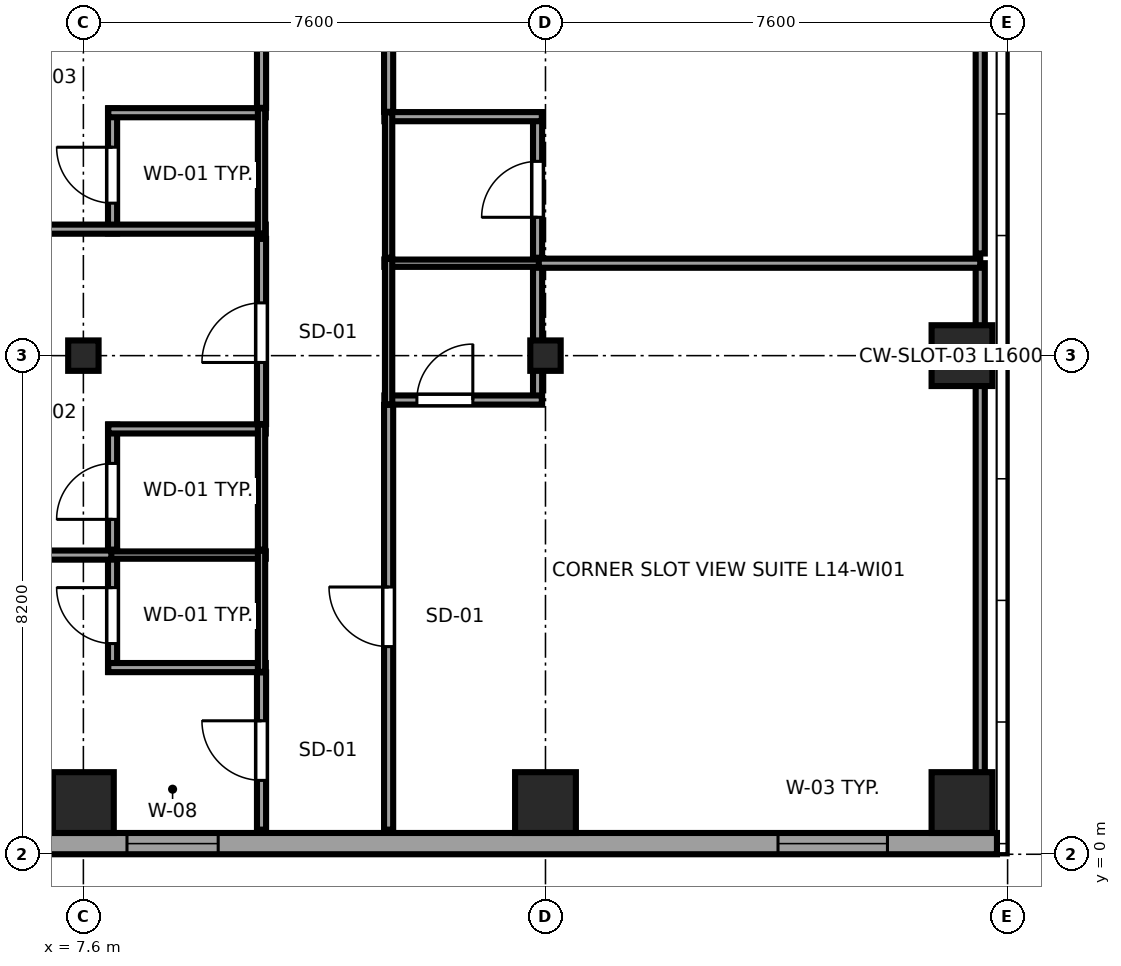
"""IFC4 building model, lengths in metres.
Left out: names, types, materials, properties, quantities, classifications, styles, units other than length and angle.
Written with IfcOpenShell. Run it as: python <this file> out.ifc"""

import sys

from ifc_helpers import new_model, si_unit, direction, frame, frame_2d, origin, origin_2d, place, context, subcontext, project, spatial, rectangle, i_section, extrude, source, transform, mapped, element, fill, save


model = new_model("IFC4")
c1 = context("Model", 3, precision=1e-05, world=origin(), true_north=direction((0.0, 1.0)))
c2 = subcontext(c1, "Body", "Model", "MODEL_VIEW")
j1 = project(units=[si_unit("LENGTHUNIT", "METRE"), si_unit("PLANEANGLEUNIT", "RADIAN")], contexts=[c1])
p1 = place(None, origin())
s1 = spatial("IfcSite", under=j1, at=p1, CompositionType="ELEMENT")
p2 = place(p1, origin())
s2 = spatial("IfcBuilding", under=s1, at=p2, CompositionType="ELEMENT")
p3 = place(p2, frame((0.0, 0.0, 60.4)))
s3 = spatial("IfcBuildingStorey", under=s2, at=p3, CompositionType="ELEMENT", Elevation=60.4)
m1 = source(origin(), c2, "Body", "SweptSolid", [
    extrude(rectangle(XDim=1.0, YDim=1.0, at=origin_2d()), origin(), (0.0, 0.0, 1.0), 3.55),
])
p4 = place(p3, frame((7.6, 0.85, 0.0), z_axis=(0.0, 0.0, 1.0), x_axis=(1.0, 0.0, 0.0)))
e1 = element("IfcColumn", 1, at=p4, inside=s3, PredefinedType="COLUMN", context=c2, shape_type="MappedRepresentation", body=[
    mapped(m1, transform((0.0, 0.0, 0.0), x_axis=(1.0, 0.0, 0.0), y_axis=(0.0, 1.0, 0.0), z_axis=(0.0, 0.0, 1.0), scale=1.0)),
])
m2 = source(origin(), c2, "Body", "SweptSolid", [
    extrude(i_section(OverallWidth=0.5, OverallDepth=0.5, WebThickness=0.028, FlangeThickness=0.045, at=origin_2d()), origin(), (0.0, 0.0, 1.0), 3.55),
])
p5 = place(p3, frame((7.6, 8.2, 0.0), z_axis=(0.0, 0.0, 1.0), x_axis=(1.0, 0.0, 0.0)))
e2 = element("IfcColumn", 2, at=p5, inside=s3, PredefinedType="COLUMN", context=c2, shape_type="MappedRepresentation", body=[
    mapped(m2, transform((0.0, 0.0, 0.0), x_axis=(1.0, 0.0, 0.0), y_axis=(0.0, 1.0, 0.0), z_axis=(0.0, 0.0, 1.0), scale=1.0)),
])
p6 = place(p3, frame((15.2, 0.85, 0.0), z_axis=(0.0, 0.0, 1.0), x_axis=(1.0, 0.0, 0.0)))
e3 = element("IfcColumn", 3, at=p6, inside=s3, PredefinedType="COLUMN", context=c2, shape_type="MappedRepresentation", body=[
    mapped(m1, transform((0.0, 0.0, 0.0), x_axis=(1.0, 0.0, 0.0), y_axis=(0.0, 1.0, 0.0), z_axis=(0.0, 0.0, 1.0), scale=1.0)),
])
p7 = place(p3, frame((15.2, 8.2, 0.0), z_axis=(0.0, 0.0, 1.0), x_axis=(1.0, 0.0, 0.0)))
e4 = element("IfcColumn", 4, at=p7, inside=s3, PredefinedType="COLUMN", context=c2, shape_type="MappedRepresentation", body=[
    mapped(m2, transform((0.0, 0.0, 0.0), x_axis=(1.0, 0.0, 0.0), y_axis=(0.0, 1.0, 0.0), z_axis=(0.0, 0.0, 1.0), scale=1.0)),
])
for number, where, z_axis, x_axis in (
    (5, (22.05, 0.85, 0.0), (0.0, 0.0, 1.0), (1.0, 0.0, 0.0)),
    (6, (22.05, 8.2, 0.0), (0.0, 0.0, 1.0), (1.0, 0.0, 0.0)),
):
    element("IfcColumn", number, at=place(p3, frame(where, z_axis=z_axis, x_axis=x_axis)), inside=s3, PredefinedType="COLUMN", context=c2, shape_type="MappedRepresentation", body=[
        mapped(m1, transform((0.0, 0.0, 0.0), x_axis=(1.0, 0.0, 0.0), y_axis=(0.0, 1.0, 0.0), z_axis=(0.0, 0.0, 1.0), scale=1.0)),
    ])
p8 = place(p3, frame((4.617, 0.175, 0.0), z_axis=(0.0, 0.0, 1.0), x_axis=(1.0, 0.0, 0.0)))
e7 = element("IfcWall", 7, at=p8, inside=s3, PredefinedType="SOLIDWALL", context=c2, shape_type="SweptSolid", body=[
    extrude(rectangle(XDim=18.008, YDim=0.35, at=frame_2d((9.004, 0.0))), origin(), (0.0, 0.0, 1.0), 3.37),
])
p9 = place(p8, frame((14.407, 0.0, 0.68)))
e8 = element("IfcOpeningElement", 8, at=p9, cuts=e7, PredefinedType="OPENING", context=c2, shape_type="SweptSolid", body=[
    extrude(rectangle(XDim=1.8, YDim=1.85, at=frame_2d((0.9, 0.925))), frame((0.0, 0.185, 0.0), z_axis=(0.0, -1.0, 0.0), x_axis=(1.0, 0.0, 0.0)), (0.0, 0.0, 1.0), 0.37),
])
p10 = place(p8, frame((3.7, 0.0, 0.62)))
e9 = element("IfcOpeningElement", 9, at=p10, cuts=e7, PredefinedType="OPENING", context=c2, shape_type="SweptSolid", body=[
    extrude(rectangle(XDim=1.5, YDim=1.55, at=frame_2d((0.75, 0.775))), frame((0.0, 0.185, 0.0), z_axis=(0.0, -1.0, 0.0), x_axis=(1.0, 0.0, 0.0)), (0.0, 0.0, 1.0), 0.37),
])
p11 = place(p3, frame((8.08, 3.0, 0.0), z_axis=(0.0, 0.0, 1.0), x_axis=(0.0, 1.0, 0.0)))
e10 = element("IfcWall", 10, at=p11, inside=s3, PredefinedType="PARTITIONING", context=c2, shape_type="SweptSolid", body=[
    extrude(rectangle(XDim=1.99, YDim=0.15, at=frame_2d((0.995, 0.0))), origin(), (0.0, 0.0, 1.0), 3.37),
])
p12 = place(p11, frame((0.465, 0.0, 0.0)))
e11 = element("IfcOpeningElement", 11, at=p12, cuts=e10, PredefinedType="OPENING", context=c2, shape_type="SweptSolid", body=[
    extrude(rectangle(XDim=0.92, YDim=2.01, at=frame_2d((0.46, 1.005))), frame((0.0, 0.085, 0.0), z_axis=(0.0, -1.0, 0.0), x_axis=(1.0, 0.0, 0.0)), (0.0, 0.0, 1.0), 0.17),
])
p13 = place(p3, frame((8.01, 3.07, 0.0), z_axis=(0.0, 0.0, 1.0), x_axis=(1.0, 0.0, 0.0)))
e12 = element("IfcWall", 12, at=p13, inside=s3, PredefinedType="PARTITIONING", context=c2, shape_type="SweptSolid", body=[
    extrude(rectangle(XDim=2.59, YDim=0.15, at=frame_2d((1.295, 0.0))), origin(), (0.0, 0.0, 1.0), 3.37),
])
p14 = place(p3, frame((8.01, 4.92, 0.0), z_axis=(0.0, 0.0, 1.0), x_axis=(1.0, 0.0, 0.0)))
e13 = element("IfcWall", 13, at=p14, inside=s3, PredefinedType="PLUMBINGWALL", context=c2, shape_type="SweptSolid", body=[
    extrude(rectangle(XDim=2.59, YDim=0.12, at=frame_2d((1.295, 0.0))), origin(), (0.0, 0.0, 1.0), 3.37),
])
p15 = place(p3, frame((10.53, 3.0, 0.0), z_axis=(0.0, 0.0, 1.0), x_axis=(0.0, 1.0, 0.0)))
e14 = element("IfcWall", 14, at=p15, inside=s3, PredefinedType="PLUMBINGWALL", context=c2, shape_type="SweptSolid", body=[
    extrude(rectangle(XDim=1.99, YDim=0.12, at=frame_2d((0.995, 0.0))), origin(), (0.0, 0.0, 1.0), 3.37),
])
p16 = place(p3, frame((8.08, 5.01, 0.0), z_axis=(0.0, 0.0, 1.0), x_axis=(0.0, 1.0, 0.0)))
e15 = element("IfcWall", 15, at=p16, inside=s3, PredefinedType="PARTITIONING", context=c2, shape_type="SweptSolid", body=[
    extrude(rectangle(XDim=2.055, YDim=0.15, at=frame_2d((1.027, 0.0))), origin(), (0.0, 0.0, 1.0), 3.37),
])
p17 = place(p16, frame((0.498, 0.0, 0.0)))
e16 = element("IfcOpeningElement", 16, at=p17, cuts=e15, PredefinedType="OPENING", context=c2, shape_type="SweptSolid", body=[
    extrude(rectangle(XDim=0.92, YDim=2.01, at=frame_2d((0.46, 1.005))), frame((0.0, 0.085, 0.0), z_axis=(0.0, -1.0, 0.0), x_axis=(1.0, 0.0, 0.0)), (0.0, 0.0, 1.0), 0.17),
])
p18 = place(p3, frame((8.01, 6.995, 0.0), z_axis=(0.0, 0.0, 1.0), x_axis=(1.0, 0.0, 0.0)))
e17 = element("IfcWall", 17, at=p18, inside=s3, PredefinedType="PARTITIONING", context=c2, shape_type="SweptSolid", body=[
    extrude(rectangle(XDim=2.59, YDim=0.15, at=frame_2d((1.295, 0.0))), origin(), (0.0, 0.0, 1.0), 3.37),
])
p19 = place(p3, frame((10.53, 5.01, 0.0), z_axis=(0.0, 0.0, 1.0), x_axis=(0.0, 1.0, 0.0)))
e18 = element("IfcWall", 18, at=p19, inside=s3, PredefinedType="PLUMBINGWALL", context=c2, shape_type="SweptSolid", body=[
    extrude(rectangle(XDim=2.055, YDim=0.12, at=frame_2d((1.027, 0.0))), origin(), (0.0, 0.0, 1.0), 3.37),
])
p20 = place(p3, frame((8.08, 10.21, 0.0), z_axis=(0.0, 0.0, 1.0), x_axis=(0.0, 1.0, 0.0)))
e19 = element("IfcWall", 19, at=p20, inside=s3, PredefinedType="PARTITIONING", context=c2, shape_type="SweptSolid", body=[
    extrude(rectangle(XDim=2.055, YDim=0.15, at=frame_2d((1.027, 0.0))), origin(), (0.0, 0.0, 1.0), 3.37),
])
p21 = place(p20, frame((0.498, 0.0, 0.0)))
e20 = element("IfcOpeningElement", 20, at=p21, cuts=e19, PredefinedType="OPENING", context=c2, shape_type="SweptSolid", body=[
    extrude(rectangle(XDim=0.92, YDim=2.01, at=frame_2d((0.46, 1.005))), frame((0.0, 0.085, 0.0), z_axis=(0.0, -1.0, 0.0), x_axis=(1.0, 0.0, 0.0)), (0.0, 0.0, 1.0), 0.17),
])
p22 = place(p3, frame((0.405, 10.28, 0.0), z_axis=(0.0, 0.0, 1.0), x_axis=(1.0, 0.0, 0.0)))
e21 = element("IfcWall", 21, at=p22, inside=s3, PredefinedType="PARTITIONING", context=c2, shape_type="SweptSolid", body=[
    extrude(rectangle(XDim=10.195, YDim=0.15, at=frame_2d((5.098, 0.0))), origin(), (0.0, 0.0, 1.0), 3.37),
])
p23 = place(p3, frame((8.01, 12.195, 0.0), z_axis=(0.0, 0.0, 1.0), x_axis=(1.0, 0.0, 0.0)))
e22 = element("IfcWall", 22, at=p23, inside=s3, PredefinedType="PARTITIONING", context=c2, shape_type="SweptSolid", body=[
    extrude(rectangle(XDim=2.59, YDim=0.15, at=frame_2d((1.295, 0.0))), origin(), (0.0, 0.0, 1.0), 3.37),
])
p24 = place(p3, frame((10.53, 10.21, 0.0), z_axis=(0.0, 0.0, 1.0), x_axis=(0.0, 1.0, 0.0)))
e23 = element("IfcWall", 23, at=p24, inside=s3, PredefinedType="PLUMBINGWALL", context=c2, shape_type="SweptSolid", body=[
    extrude(rectangle(XDim=2.055, YDim=0.12, at=frame_2d((1.027, 0.0))), origin(), (0.0, 0.0, 1.0), 3.37),
])
p25 = place(p3, frame((15.07, 7.4, 0.0), z_axis=(0.0, 0.0, 1.0), x_axis=(0.0, 1.0, 0.0)))
e24 = element("IfcWall", 24, at=p25, inside=s3, PredefinedType="PARTITIONING", context=c2, shape_type="SweptSolid", body=[
    extrude(rectangle(XDim=2.39, YDim=0.15, at=frame_2d((1.195, 0.0))), origin(), (0.0, 0.0, 1.0), 2.827),
])
p26 = place(p3, frame((12.55, 7.47, 0.0), z_axis=(0.0, 0.0, 1.0), x_axis=(1.0, 0.0, 0.0)))
e25 = element("IfcWall", 25, at=p26, inside=s3, PredefinedType="PARTITIONING", context=c2, shape_type="SweptSolid", body=[
    extrude(rectangle(XDim=2.59, YDim=0.15, at=frame_2d((1.295, 0.0))), origin(), (0.0, 0.0, 1.0), 3.37),
])
p27 = place(p26, frame((0.535, 0.0, 0.0)))
e26 = element("IfcOpeningElement", 26, at=p27, cuts=e25, PredefinedType="OPENING", context=c2, shape_type="SweptSolid", body=[
    extrude(rectangle(XDim=0.92, YDim=2.01, at=frame_2d((0.46, 1.005))), frame((0.0, 0.085, 0.0), z_axis=(0.0, -1.0, 0.0), x_axis=(1.0, 0.0, 0.0)), (0.0, 0.0, 1.0), 0.17),
])
p28 = place(p3, frame((12.55, 9.72, 0.0), z_axis=(0.0, 0.0, 1.0), x_axis=(1.0, 0.0, 0.0)))
e27 = element("IfcWall", 27, at=p28, inside=s3, PredefinedType="PLUMBINGWALL", context=c2, shape_type="SweptSolid", body=[
    extrude(rectangle(XDim=2.59, YDim=0.12, at=frame_2d((1.295, 0.0))), origin(), (0.0, 0.0, 1.0), 3.37),
])
p29 = place(p3, frame((12.62, 7.4, 0.0), z_axis=(0.0, 0.0, 1.0), x_axis=(0.0, 1.0, 0.0)))
e28 = element("IfcWall", 28, at=p29, inside=s3, PredefinedType="PLUMBINGWALL", context=c2, shape_type="SweptSolid", body=[
    extrude(rectangle(XDim=2.39, YDim=0.12, at=frame_2d((1.195, 0.0))), origin(), (0.0, 0.0, 1.0), 3.37),
])
p30 = place(p3, frame((15.07, 9.81, 0.0), z_axis=(0.0, 0.0, 1.0), x_axis=(0.0, 1.0, 0.0)))
e29 = element("IfcWall", 29, at=p30, inside=s3, PredefinedType="PARTITIONING", context=c2, shape_type="SweptSolid", body=[
    extrude(rectangle(XDim=2.39, YDim=0.15, at=frame_2d((1.195, 0.0))), origin(), (0.0, 0.0, 1.0), 2.827),
])
p31 = place(p30, frame((0.665, 0.0, 0.0)))
e30 = element("IfcOpeningElement", 30, at=p31, cuts=e29, PredefinedType="OPENING", context=c2, shape_type="SweptSolid", body=[
    extrude(rectangle(XDim=0.92, YDim=2.01, at=frame_2d((0.46, 1.005))), frame((0.0, 0.085, 0.0), z_axis=(0.0, -1.0, 0.0), x_axis=(1.0, 0.0, 0.0)), (0.0, 0.0, 1.0), 0.17),
])
p32 = place(p3, frame((12.55, 12.13, 0.0), z_axis=(0.0, 0.0, 1.0), x_axis=(1.0, 0.0, 0.0)))
e31 = element("IfcWall", 31, at=p32, inside=s3, PredefinedType="PARTITIONING", context=c2, shape_type="SweptSolid", body=[
    extrude(rectangle(XDim=2.59, YDim=0.15, at=frame_2d((1.295, 0.0))), origin(), (0.0, 0.0, 1.0), 3.37),
])
p33 = place(p3, frame((12.62, 9.81, 0.0), z_axis=(0.0, 0.0, 1.0), x_axis=(0.0, 1.0, 0.0)))
e32 = element("IfcWall", 32, at=p33, inside=s3, PredefinedType="PLUMBINGWALL", context=c2, shape_type="SweptSolid", body=[
    extrude(rectangle(XDim=2.39, YDim=0.12, at=frame_2d((1.195, 0.0))), origin(), (0.0, 0.0, 1.0), 3.37),
])
p34 = place(p3, frame((10.53, 0.405, 0.0), z_axis=(0.0, 0.0, 1.0), x_axis=(0.0, 1.0, 0.0)))
e33 = element("IfcWall", 33, at=p34, inside=s3, PredefinedType="PARTITIONING", context=c2, shape_type="SweptSolid", body=[
    extrude(rectangle(XDim=2.585, YDim=0.15, at=frame_2d((1.292, 0.0))), origin(), (0.0, 0.0, 1.0), 3.37),
])
p35 = place(p34, frame((0.81, 0.0, 0.0)))
e34 = element("IfcOpeningElement", 34, at=p35, cuts=e33, PredefinedType="OPENING", context=c2, shape_type="SweptSolid", body=[
    extrude(rectangle(XDim=0.98, YDim=2.12, at=frame_2d((0.49, 1.06))), frame((0.0, 0.085, 0.0), z_axis=(0.0, -1.0, 0.0), x_axis=(1.0, 0.0, 0.0)), (0.0, 0.0, 1.0), 0.17),
])
p36 = place(p3, frame((0.405, 4.92, 0.0), z_axis=(0.0, 0.0, 1.0), x_axis=(1.0, 0.0, 0.0)))
e35 = element("IfcWall", 35, at=p36, inside=s3, PredefinedType="PARTITIONING", context=c2, shape_type="SweptSolid", body=[
    extrude(rectangle(XDim=7.655, YDim=0.15, at=frame_2d((3.828, 0.0))), origin(), (0.0, 0.0, 1.0), 3.37),
])
p37 = place(p3, frame((10.53, 7.075, 0.0), z_axis=(0.0, 0.0, 1.0), x_axis=(0.0, 1.0, 0.0)))
e36 = element("IfcWall", 36, at=p37, inside=s3, PredefinedType="PARTITIONING", context=c2, shape_type="SweptSolid", body=[
    extrude(rectangle(XDim=3.045, YDim=0.15, at=frame_2d((1.522, 0.0))), origin(), (0.0, 0.0, 1.0), 3.37),
])
p38 = place(p37, frame((1.012, 0.0, 0.0)))
e37 = element("IfcOpeningElement", 37, at=p38, cuts=e36, PredefinedType="OPENING", context=c2, shape_type="SweptSolid", body=[
    extrude(rectangle(XDim=0.98, YDim=2.12, at=frame_2d((0.49, 1.06))), frame((0.0, 0.085, 0.0), z_axis=(0.0, -1.0, 0.0), x_axis=(1.0, 0.0, 0.0)), (0.0, 0.0, 1.0), 0.17),
])
p39 = place(p3, frame((10.53, 12.275, 0.0), z_axis=(0.0, 0.0, 1.0), x_axis=(0.0, 1.0, 0.0)))
e38 = element("IfcWall", 38, at=p39, inside=s3, PredefinedType="PARTITIONING", context=c2, shape_type="SweptSolid", body=[
    extrude(rectangle(XDim=3.045, YDim=0.15, at=frame_2d((1.522, 0.0))), origin(), (0.0, 0.0, 1.0), 3.37),
])
p40 = place(p39, frame((1.012, 0.0, 0.0)))
e39 = element("IfcOpeningElement", 39, at=p40, cuts=e38, PredefinedType="OPENING", context=c2, shape_type="SweptSolid", body=[
    extrude(rectangle(XDim=0.98, YDim=2.12, at=frame_2d((0.49, 1.06))), frame((0.0, 0.085, 0.0), z_axis=(0.0, -1.0, 0.0), x_axis=(1.0, 0.0, 0.0)), (0.0, 0.0, 1.0), 0.17),
])
p41 = place(p3, frame((12.62, 0.405, 0.0), z_axis=(0.0, 0.0, 1.0), x_axis=(0.0, 1.0, 0.0)))
e40 = element("IfcWall", 40, at=p41, inside=s3, PredefinedType="PARTITIONING", context=c2, shape_type="SweptSolid", body=[
    extrude(rectangle(XDim=6.985, YDim=0.15, at=frame_2d((3.492, 0.0))), origin(), (0.0, 0.0, 1.0), 3.37),
])
p42 = place(p41, frame((3.01, 0.0, 0.0)))
e41 = element("IfcOpeningElement", 41, at=p42, cuts=e40, PredefinedType="OPENING", context=c2, shape_type="SweptSolid", body=[
    extrude(rectangle(XDim=0.98, YDim=2.12, at=frame_2d((0.49, 1.06))), frame((0.0, 0.085, 0.0), z_axis=(0.0, -1.0, 0.0), x_axis=(1.0, 0.0, 0.0)), (0.0, 0.0, 1.0), 0.17),
])
p43 = place(p3, frame((22.35, 0.405, 0.0), z_axis=(0.0, 0.0, 1.0), x_axis=(0.0, 1.0, 0.0)))
e42 = element("IfcWall", 42, at=p43, inside=s3, PredefinedType="PARTITIONING", context=c2, shape_type="SweptSolid", body=[
    extrude(rectangle(XDim=9.315, YDim=0.15, at=frame_2d((4.657, 0.0))), origin(), (0.0, 0.0, 1.0), 3.37),
])
p44 = place(p3, frame((15.09, 9.72, 0.0), z_axis=(0.0, 0.0, 1.0), x_axis=(1.0, 0.0, 0.0)))
e43 = element("IfcWall", 43, at=p44, inside=s3, PredefinedType="PARTITIONING", context=c2, shape_type="SweptSolid", body=[
    extrude(rectangle(XDim=7.26, YDim=0.15, at=frame_2d((3.63, 0.0))), origin(), (0.0, 0.0, 1.0), 3.37),
])
p45 = place(p3, frame((12.62, 12.21, 0.0), z_axis=(0.0, 0.0, 1.0), x_axis=(0.0, 1.0, 0.0)))
e44 = element("IfcWall", 44, at=p45, inside=s3, PredefinedType="PARTITIONING", context=c2, shape_type="SweptSolid", body=[
    extrude(rectangle(XDim=8.01, YDim=0.15, at=frame_2d((4.005, 0.0))), origin(), (0.0, 0.0, 1.0), 3.37),
])
p46 = place(p45, frame((3.495, 0.0, 0.0)))
e45 = element("IfcOpeningElement", 45, at=p46, cuts=e44, PredefinedType="OPENING", context=c2, shape_type="SweptSolid", body=[
    extrude(rectangle(XDim=0.98, YDim=2.12, at=frame_2d((0.49, 1.06))), frame((0.0, 0.085, 0.0), z_axis=(0.0, -1.0, 0.0), x_axis=(1.0, 0.0, 0.0)), (0.0, 0.0, 1.0), 0.17),
])
p47 = place(p3, frame((22.35, 9.88, 0.0), z_axis=(0.0, 0.0, 1.0), x_axis=(0.0, 1.0, 0.0)))
e46 = element("IfcWall", 46, at=p47, inside=s3, PredefinedType="PARTITIONING", context=c2, shape_type="SweptSolid", body=[
    extrude(rectangle(XDim=10.34, YDim=0.15, at=frame_2d((5.17, 0.0))), origin(), (0.0, 0.0, 1.0), 3.37),
])
m3 = source(origin(), c2, "Body", "SweptSolid", [
    extrude(rectangle(XDim=1.8, YDim=1.85, at=frame_2d((0.9, 0.925))), frame((0.0, 0.09, 0.0), z_axis=(0.0, -1.0, 0.0), x_axis=(1.0, 0.0, 0.0)), (0.0, 0.0, 1.0), 0.06),
])
p48 = place(p9, origin())
e47 = element("IfcWindow", 47, at=p48, inside=s3, PartitioningType="TRIPLE_PANEL_HORIZONTAL", PredefinedType="WINDOW", context=c2, shape_type="MappedRepresentation", body=[
    mapped(m3, transform((0.0, 0.0, 0.0), x_axis=(1.0, 0.0, 0.0), y_axis=(0.0, 1.0, 0.0), z_axis=(0.0, 0.0, 1.0), scale=1.0)),
])
fill(e8, e47)
m4 = source(origin(), c2, "Body", "SweptSolid", [
    extrude(rectangle(XDim=1.5, YDim=1.55, at=frame_2d((0.75, 0.775))), frame((0.0, 0.09, 0.0), z_axis=(0.0, -1.0, 0.0), x_axis=(1.0, 0.0, 0.0)), (0.0, 0.0, 1.0), 0.06),
])
p49 = place(p10, origin())
e48 = element("IfcWindow", 48, at=p49, inside=s3, PartitioningType="SINGLE_PANEL", PredefinedType="WINDOW", context=c2, shape_type="MappedRepresentation", body=[
    mapped(m4, transform((0.0, 0.0, 0.0), x_axis=(1.0, 0.0, 0.0), y_axis=(0.0, 1.0, 0.0), z_axis=(0.0, 0.0, 1.0), scale=1.0)),
])
fill(e9, e48)
m5 = source(origin(), c2, "Body", "SweptSolid", [
    extrude(rectangle(XDim=0.92, YDim=2.01, at=frame_2d((0.46, 1.005))), frame((0.0, 0.025, 0.0), z_axis=(0.0, -1.0, 0.0), x_axis=(1.0, 0.0, 0.0)), (0.0, 0.0, 1.0), 0.05),
])
p50 = place(p12, origin())
e49 = element("IfcDoor", 49, at=p50, inside=s3, OperationType="SINGLE_SWING_RIGHT", PredefinedType="DOOR", context=c2, shape_type="MappedRepresentation", body=[
    mapped(m5, transform((0.0, 0.0, 0.0), x_axis=(1.0, 0.0, 0.0), y_axis=(0.0, 1.0, 0.0), z_axis=(0.0, 0.0, 1.0), scale=1.0)),
])
fill(e11, e49)
p51 = place(p17, origin())
e50 = element("IfcDoor", 50, at=p51, inside=s3, OperationType="SINGLE_SWING_LEFT", PredefinedType="DOOR", context=c2, shape_type="MappedRepresentation", body=[
    mapped(m5, transform((0.0, 0.0, 0.0), x_axis=(1.0, 0.0, 0.0), y_axis=(0.0, 1.0, 0.0), z_axis=(0.0, 0.0, 1.0), scale=1.0)),
])
fill(e16, e50)
p52 = place(p21, origin())
e51 = element("IfcDoor", 51, at=p52, inside=s3, OperationType="SINGLE_SWING_RIGHT", PredefinedType="DOOR", context=c2, shape_type="MappedRepresentation", body=[
    mapped(m5, transform((0.0, 0.0, 0.0), x_axis=(1.0, 0.0, 0.0), y_axis=(0.0, 1.0, 0.0), z_axis=(0.0, 0.0, 1.0), scale=1.0)),
])
fill(e20, e51)
p53 = place(p27, origin())
e52 = element("IfcDoor", 52, at=p53, inside=s3, OperationType="SINGLE_SWING_RIGHT", PredefinedType="DOOR", context=c2, shape_type="MappedRepresentation", body=[
    mapped(m5, transform((0.0, 0.0, 0.0), x_axis=(1.0, 0.0, 0.0), y_axis=(0.0, 1.0, 0.0), z_axis=(0.0, 0.0, 1.0), scale=1.0)),
])
fill(e26, e52)
p54 = place(p31, origin())
e53 = element("IfcDoor", 53, at=p54, inside=s3, OperationType="SINGLE_SWING_LEFT", PredefinedType="DOOR", context=c2, shape_type="MappedRepresentation", body=[
    mapped(m5, transform((0.0, 0.0, 0.0), x_axis=(1.0, 0.0, 0.0), y_axis=(0.0, 1.0, 0.0), z_axis=(0.0, 0.0, 1.0), scale=1.0)),
])
fill(e30, e53)
m6 = source(origin(), c2, "Body", "SweptSolid", [
    extrude(rectangle(XDim=0.98, YDim=2.12, at=frame_2d((0.49, 1.06))), frame((0.0, 0.025, 0.0), z_axis=(0.0, -1.0, 0.0), x_axis=(1.0, 0.0, 0.0)), (0.0, 0.0, 1.0), 0.05),
])
p55 = place(p35, origin())
e54 = element("IfcDoor", 54, at=p55, inside=s3, OperationType="SINGLE_SWING_RIGHT", PredefinedType="DOOR", context=c2, shape_type="MappedRepresentation", body=[
    mapped(m6, transform((0.0, 0.0, 0.0), x_axis=(1.0, 0.0, 0.0), y_axis=(0.0, 1.0, 0.0), z_axis=(0.0, 0.0, 1.0), scale=1.0)),
])
fill(e34, e54)
p56 = place(p38, origin())
e55 = element("IfcDoor", 55, at=p56, inside=s3, OperationType="SINGLE_SWING_LEFT", PredefinedType="DOOR", context=c2, shape_type="MappedRepresentation", body=[
    mapped(m6, transform((0.0, 0.0, 0.0), x_axis=(1.0, 0.0, 0.0), y_axis=(0.0, 1.0, 0.0), z_axis=(0.0, 0.0, 1.0), scale=1.0)),
])
fill(e37, e55)
p57 = place(p42, origin())
e56 = element("IfcDoor", 56, at=p57, inside=s3, OperationType="SINGLE_SWING_RIGHT", PredefinedType="DOOR", context=c2, shape_type="MappedRepresentation", body=[
    mapped(m6, transform((0.0, 0.0, 0.0), x_axis=(1.0, 0.0, 0.0), y_axis=(0.0, 1.0, 0.0), z_axis=(0.0, 0.0, 1.0), scale=1.0)),
])
fill(e41, e56)
save(model, sys.argv[1])
